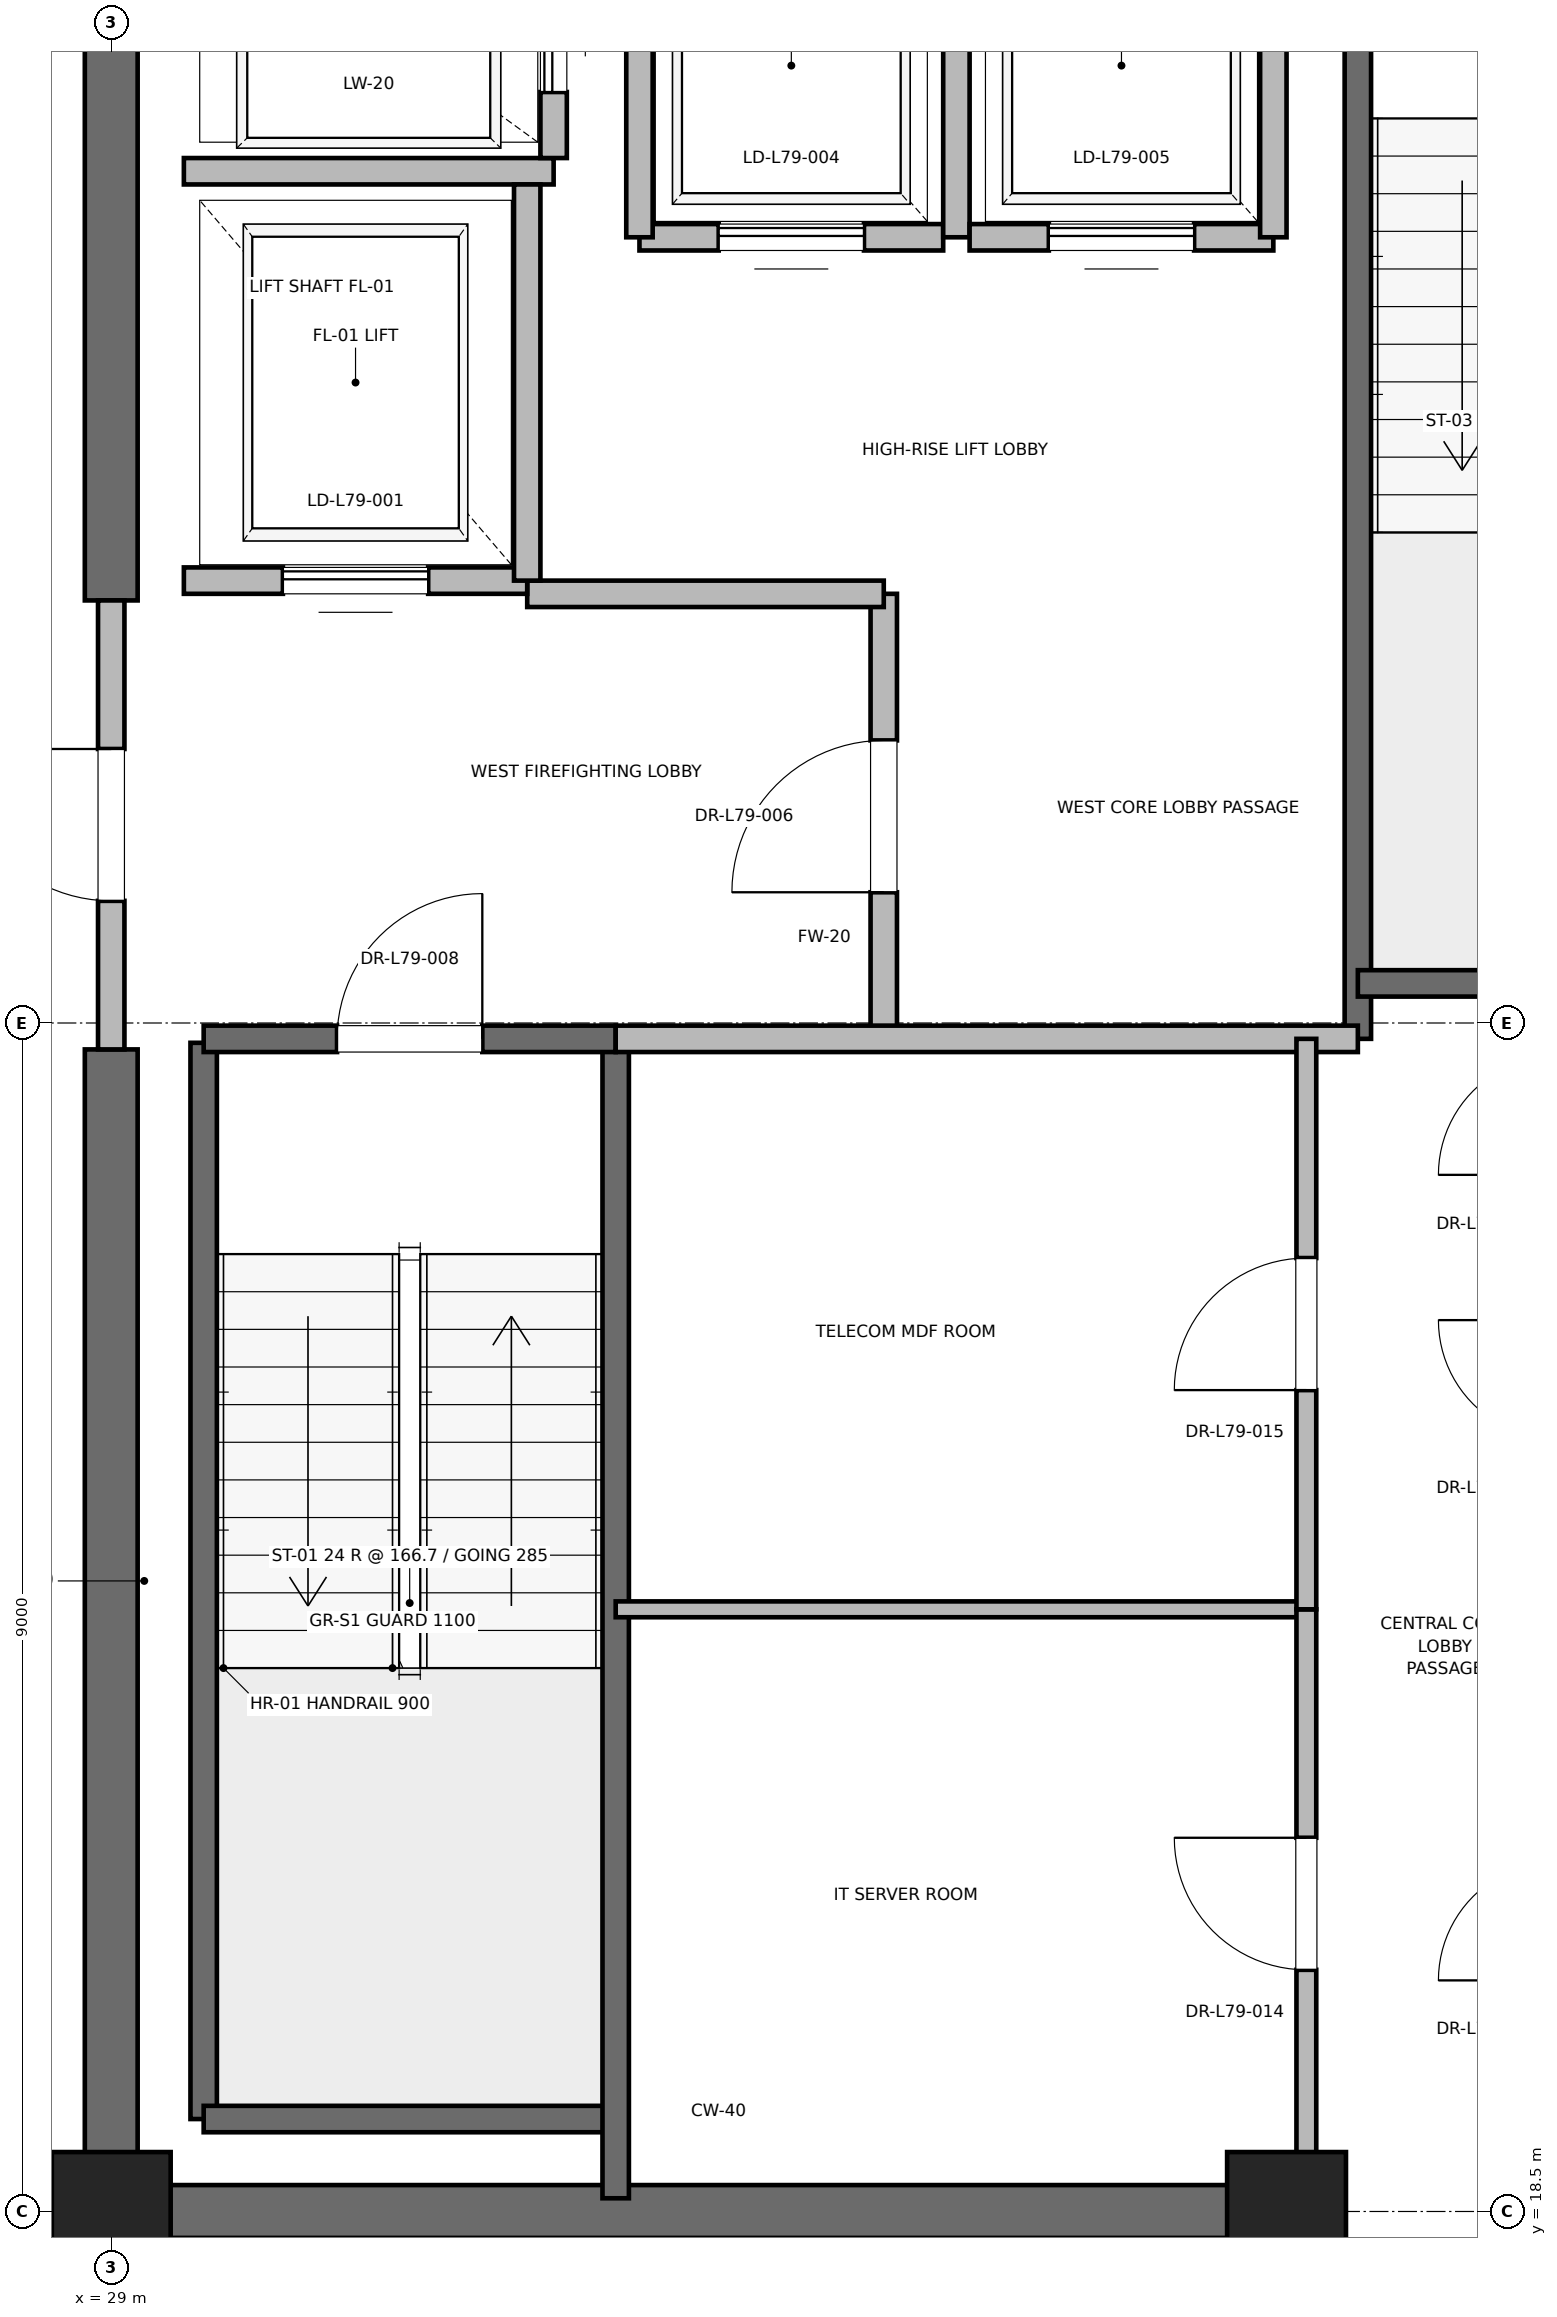
"""IFC4 building model, lengths in metres.
Left out: names, types, materials, properties, quantities, classifications, styles, units other than length and angle.
Written with IfcOpenShell. Run it as: python <this file> out.ifc"""

import sys

from ifc_helpers import new_model, si_unit, direction, frame, frame_2d, origin, origin_2d, place, context, subcontext, project, spatial, rectangle, extrude, element, fill, save


model = new_model("IFC4")
c1 = context("Model", 3, precision=1e-05, world=origin(), true_north=direction((0.0, 1.0)))
c2 = subcontext(c1, "Body", "Model", "MODEL_VIEW")
j1 = project(units=[si_unit("LENGTHUNIT", "METRE"), si_unit("PLANEANGLEUNIT", "RADIAN")], contexts=[c1])
p1 = place(None, origin())
s1 = spatial("IfcSite", under=j1, at=p1, CompositionType="ELEMENT")
p2 = place(p1, origin())
s2 = spatial("IfcBuilding", under=s1, at=p2, CompositionType="ELEMENT")
p3 = place(p2, frame((0.0, 0.0, 338.8)))
s3 = spatial("IfcBuildingStorey", under=s2, at=p3, CompositionType="ELEMENT", Elevation=338.8)
for number, where, z_axis, x_axis in (
    (1, (29.0, 18.5, 0.0), (0.0, 0.0, 1.0), (1.0, 0.0, 0.0)),
    (2, (37.9, 18.5, 0.0), (0.0, 0.0, 1.0), (1.0, 0.0, 0.0)),
):
    element("IfcColumn", number, at=place(p3, frame(where, z_axis=z_axis, x_axis=x_axis)), inside=s3, PredefinedType="PILASTER", context=c2, shape_type="SweptSolid", body=[
        extrude(rectangle(XDim=0.9, YDim=0.9, at=origin_2d()), origin(), (0.0, 0.0, 1.0), 4.0),
    ])
p4 = place(p3, frame((29.0, 18.5, 0.0), z_axis=(0.0, 0.0, 1.0), x_axis=(1.0, 0.0, 0.0)))
e3 = element("IfcWall", 3, at=p4, inside=s3, PredefinedType="SHEAR", context=c2, shape_type="SweptSolid", body=[
    extrude(rectangle(XDim=9.2, YDim=0.4, at=frame_2d((4.6, 0.0))), origin(), (0.0, 0.0, 1.0), 3.7),
])
p5 = place(p3, frame((29.0, 18.5, 0.0), z_axis=(0.0, 0.0, 1.0), x_axis=(0.0, 1.0, 0.0)))
e4 = element("IfcWall", 4, at=p5, inside=s3, PredefinedType="SHEAR", context=c2, shape_type="SweptSolid", body=[
    extrude(rectangle(XDim=8.8, YDim=0.4, at=frame_2d((4.4, 0.0))), origin(), (0.0, 0.0, 1.0), 3.7),
])
p6 = place(p3, frame((29.0, 30.7, 0.0), z_axis=(0.0, 0.0, 1.0), x_axis=(0.0, 1.0, 0.0)))
e5 = element("IfcWall", 5, at=p6, inside=s3, PredefinedType="SHEAR", context=c2, shape_type="SweptSolid", body=[
    extrude(rectangle(XDim=5.8, YDim=0.4, at=frame_2d((2.9, 0.0))), origin(), (0.0, 0.0, 1.0), 3.7),
])
p7 = place(p3, frame((29.7, 19.2, 0.0), z_axis=(0.0, 0.0, 1.0), x_axis=(0.0, 1.0, 0.0)))
e6 = element("IfcWall", 6, at=p7, inside=s3, PredefinedType="SOLIDWALL", context=c2, shape_type="SweptSolid", body=[
    extrude(rectangle(XDim=8.15, YDim=0.2, at=frame_2d((4.075, 0.0))), origin(), (0.0, 0.0, 1.0), 3.7),
])
p8 = place(p3, frame((29.7, 19.2, 0.0), z_axis=(0.0, 0.0, 1.0), x_axis=(1.0, 0.0, 0.0)))
e7 = element("IfcWall", 7, at=p8, inside=s3, PredefinedType="SOLIDWALL", context=c2, shape_type="SweptSolid", body=[
    extrude(rectangle(XDim=3.12, YDim=0.2, at=frame_2d((1.56, 0.0))), origin(), (0.0, 0.0, 1.0), 3.7),
])
p9 = place(p3, frame((32.82, 18.6, 0.0), z_axis=(0.0, 0.0, 1.0), x_axis=(0.0, 1.0, 0.0)))
e8 = element("IfcWall", 8, at=p9, inside=s3, PredefinedType="SOLIDWALL", context=c2, shape_type="SweptSolid", body=[
    extrude(rectangle(XDim=8.78, YDim=0.2, at=frame_2d((4.39, 0.0))), origin(), (0.0, 0.0, 1.0), 3.7),
])
p10 = place(p3, frame((29.7, 27.38, 0.0), z_axis=(0.0, 0.0, 1.0), x_axis=(1.0, 0.0, 0.0)))
e9 = element("IfcWall", 9, at=p10, inside=s3, PredefinedType="SOLIDWALL", context=c2, shape_type="SweptSolid", body=[
    extrude(rectangle(XDim=3.12, YDim=0.2, at=frame_2d((1.56, 0.0))), origin(), (0.0, 0.0, 1.0), 3.7),
])
p11 = place(p10, frame((1.01, 0.0, 0.0)))
e10 = element("IfcOpeningElement", 10, at=p11, cuts=e9, PredefinedType="OPENING", context=c2, shape_type="SweptSolid", body=[
    extrude(rectangle(XDim=1.1, YDim=2.15, at=frame_2d((0.55, 1.075))), frame((0.0, 0.1, 0.0), z_axis=(0.0, -1.0, 0.0), x_axis=(1.0, 0.0, 0.0)), (0.0, 0.0, 1.0), 0.2),
])
p12 = place(p3, frame((38.44, 27.38, 0.0), z_axis=(0.0, 0.0, 1.0), x_axis=(0.0, 1.0, 0.0)))
e11 = element("IfcWall", 11, at=p12, inside=s3, PredefinedType="SOLIDWALL", context=c2, shape_type="SweptSolid", body=[
    extrude(rectangle(XDim=8.87, YDim=0.2, at=frame_2d((4.435, 0.0))), origin(), (0.0, 0.0, 1.0), 3.7),
])
p13 = place(p3, frame((38.44, 27.8, 0.0), z_axis=(0.0, 0.0, 1.0), x_axis=(1.0, 0.0, 0.0)))
e12 = element("IfcWall", 12, at=p13, inside=s3, PredefinedType="SOLIDWALL", context=c2, shape_type="SweptSolid", body=[
    extrude(rectangle(XDim=3.32, YDim=0.2, at=frame_2d((1.66, 0.0))), origin(), (0.0, 0.0, 1.0), 3.7),
])
p14 = place(p3, frame((34.85, 27.38, 0.0), z_axis=(0.0, 0.0, 1.0), x_axis=(0.0, 1.0, 0.0)))
e13 = element("IfcWall", 13, at=p14, inside=s3, PredefinedType="PARTITIONING", context=c2, shape_type="SweptSolid", body=[
    extrude(rectangle(XDim=3.37, YDim=0.2, at=frame_2d((1.685, 0.0))), origin(), (0.0, 0.0, 1.0), 3.7),
])
p15 = place(p14, frame((1.11, 0.0, 0.0)))
e14 = element("IfcOpeningElement", 14, at=p15, cuts=e13, PredefinedType="OPENING", context=c2, shape_type="SweptSolid", body=[
    extrude(rectangle(XDim=1.15, YDim=2.2, at=frame_2d((0.575, 1.1))), frame((0.0, 0.1, 0.0), z_axis=(0.0, -1.0, 0.0), x_axis=(1.0, 0.0, 0.0)), (0.0, 0.0, 1.0), 0.2),
])
p16 = place(p3, frame((29.0, 27.3, 0.0), z_axis=(0.0, 0.0, 1.0), x_axis=(0.0, 1.0, 0.0)))
e15 = element("IfcWall", 15, at=p16, inside=s3, PredefinedType="PARTITIONING", context=c2, shape_type="SweptSolid", body=[
    extrude(rectangle(XDim=3.4, YDim=0.2, at=frame_2d((1.7, 0.0))), origin(), (0.0, 0.0, 1.0), 2.78),
])
p17 = place(p16, frame((1.125, 0.0, 0.0)))
e16 = element("IfcOpeningElement", 16, at=p17, cuts=e15, PredefinedType="OPENING", context=c2, shape_type="SweptSolid", body=[
    extrude(rectangle(XDim=1.15, YDim=2.2, at=frame_2d((0.575, 1.1))), frame((0.0, 0.1, 0.0), z_axis=(0.0, -1.0, 0.0), x_axis=(1.0, 0.0, 0.0)), (0.0, 0.0, 1.0), 0.2),
])
p18 = place(p3, frame((32.82, 27.38, 0.0), z_axis=(0.0, 0.0, 1.0), x_axis=(1.0, 0.0, 0.0)))
e17 = element("IfcWall", 17, at=p18, inside=s3, PredefinedType="PARTITIONING", context=c2, shape_type="SweptSolid", body=[
    extrude(rectangle(XDim=5.62, YDim=0.2, at=frame_2d((2.81, 0.0))), origin(), (0.0, 0.0, 1.0), 3.7),
])
p19 = place(p3, frame((32.15, 30.75, 0.0), z_axis=(0.0, 0.0, 1.0), x_axis=(1.0, 0.0, 0.0)))
e18 = element("IfcWall", 18, at=p19, inside=s3, PredefinedType="PARTITIONING", context=c2, shape_type="SweptSolid", body=[
    extrude(rectangle(XDim=2.7, YDim=0.2, at=frame_2d((1.35, 0.0))), origin(), (0.0, 0.0, 1.0), 3.7),
])
p20 = place(p3, frame((29.55, 30.85, 0.0), z_axis=(0.0, 0.0, 1.0), x_axis=(1.0, 0.0, 0.0)))
e19 = element("IfcWall", 19, at=p20, inside=s3, PredefinedType="SOLIDWALL", context=c2, shape_type="SweptSolid", body=[
    extrude(rectangle(XDim=2.6, YDim=0.2, at=frame_2d((1.3, 0.0))), origin(), (0.0, 0.0, 1.0), 2.78),
])
p21 = place(p20, frame((0.75, 0.0, 0.0)))
e20 = element("IfcOpeningElement", 20, at=p21, cuts=e19, PredefinedType="OPENING", context=c2, shape_type="SweptSolid", body=[
    extrude(rectangle(XDim=1.1, YDim=2.2, at=frame_2d((0.55, 1.1))), frame((0.0, 0.1, 0.0), z_axis=(0.0, -1.0, 0.0), x_axis=(1.0, 0.0, 0.0)), (0.0, 0.0, 1.0), 0.2),
])
p22 = place(p3, frame((29.55, 33.95, 0.0), z_axis=(0.0, 0.0, 1.0), x_axis=(1.0, 0.0, 0.0)))
e21 = element("IfcWall", 21, at=p22, inside=s3, PredefinedType="SOLIDWALL", context=c2, shape_type="SweptSolid", body=[
    extrude(rectangle(XDim=2.8, YDim=0.2, at=frame_2d((1.4, 0.0))), origin(), (0.0, 0.0, 1.0), 3.7),
])
p23 = place(p3, frame((32.15, 30.85, 0.0), z_axis=(0.0, 0.0, 1.0), x_axis=(0.0, 1.0, 0.0)))
e22 = element("IfcWall", 22, at=p23, inside=s3, PredefinedType="SOLIDWALL", context=c2, shape_type="SweptSolid", body=[
    extrude(rectangle(XDim=3.0, YDim=0.2, at=frame_2d((1.5, 0.0))), origin(), (0.0, 0.0, 1.0), 3.7),
])
p24 = place(p3, frame((32.35, 34.05, 0.0), z_axis=(0.0, 0.0, 1.0), x_axis=(0.0, 1.0, 0.0)))
e23 = element("IfcWall", 23, at=p24, inside=s3, PredefinedType="SOLIDWALL", context=c2, shape_type="SweptSolid", body=[
    extrude(rectangle(XDim=2.1, YDim=0.2, at=frame_2d((1.05, 0.0))), origin(), (0.0, 0.0, 1.0), 3.7),
])
p25 = place(p24, frame((0.5, 0.0, 0.0)))
e24 = element("IfcOpeningElement", 24, at=p25, cuts=e23, PredefinedType="OPENING", context=c2, shape_type="SweptSolid", body=[
    extrude(rectangle(XDim=1.1, YDim=2.2, at=frame_2d((0.55, 1.1))), frame((0.0, 0.1, 0.0), z_axis=(0.0, -1.0, 0.0), x_axis=(1.0, 0.0, 0.0)), (0.0, 0.0, 1.0), 0.2),
])
p26 = place(p3, frame((33.0, 33.45, 0.0), z_axis=(0.0, 0.0, 1.0), x_axis=(1.0, 0.0, 0.0)))
e25 = element("IfcWall", 25, at=p26, inside=s3, PredefinedType="SOLIDWALL", context=c2, shape_type="SweptSolid", body=[
    extrude(rectangle(XDim=2.3, YDim=0.2, at=frame_2d((1.15, 0.0))), origin(), (0.0, 0.0, 1.0), 3.7),
])
p27 = place(p26, frame((0.6, 0.0, 0.0)))
e26 = element("IfcOpeningElement", 26, at=p27, cuts=e25, PredefinedType="OPENING", context=c2, shape_type="SweptSolid", body=[
    extrude(rectangle(XDim=1.1, YDim=2.2, at=frame_2d((0.55, 1.1))), frame((0.0, 0.1, 0.0), z_axis=(0.0, -1.0, 0.0), x_axis=(1.0, 0.0, 0.0)), (0.0, 0.0, 1.0), 0.2),
])
p28 = place(p3, frame((33.0, 36.05, 0.0), z_axis=(0.0, 0.0, 1.0), x_axis=(0.0, -1.0, 0.0)))
e27 = element("IfcWall", 27, at=p28, inside=s3, PredefinedType="SOLIDWALL", context=c2, shape_type="SweptSolid", body=[
    extrude(rectangle(XDim=2.6, YDim=0.2, at=frame_2d((1.3, 0.0))), origin(), (0.0, 0.0, 1.0), 3.7),
])
p29 = place(p3, frame((35.4, 33.45, 0.0), z_axis=(0.0, 0.0, 1.0), x_axis=(0.0, 1.0, 0.0)))
e28 = element("IfcWall", 28, at=p29, inside=s3, PredefinedType="SOLIDWALL", context=c2, shape_type="SweptSolid", body=[
    extrude(rectangle(XDim=2.6, YDim=0.2, at=frame_2d((1.3, 0.0))), origin(), (0.0, 0.0, 1.0), 2.78),
])
p30 = place(p3, frame((35.5, 33.45, 0.0), z_axis=(0.0, 0.0, 1.0), x_axis=(1.0, 0.0, 0.0)))
e29 = element("IfcWall", 29, at=p30, inside=s3, PredefinedType="SOLIDWALL", context=c2, shape_type="SweptSolid", body=[
    extrude(rectangle(XDim=2.3, YDim=0.2, at=frame_2d((1.15, 0.0))), origin(), (0.0, 0.0, 1.0), 3.7),
])
p31 = place(p30, frame((0.6, 0.0, 0.0)))
e30 = element("IfcOpeningElement", 30, at=p31, cuts=e29, PredefinedType="OPENING", context=c2, shape_type="SweptSolid", body=[
    extrude(rectangle(XDim=1.1, YDim=2.2, at=frame_2d((0.55, 1.1))), frame((0.0, 0.1, 0.0), z_axis=(0.0, -1.0, 0.0), x_axis=(1.0, 0.0, 0.0)), (0.0, 0.0, 1.0), 0.2),
])
p32 = place(p3, frame((37.8, 33.45, 0.0), z_axis=(0.0, 0.0, 1.0), x_axis=(0.0, 1.0, 0.0)))
e31 = element("IfcWall", 31, at=p32, inside=s3, PredefinedType="SOLIDWALL", context=c2, shape_type="SweptSolid", body=[
    extrude(rectangle(XDim=2.6, YDim=0.2, at=frame_2d((1.3, 0.0))), origin(), (0.0, 0.0, 1.0), 2.78),
])
p33 = place(p3, frame((32.82, 23.06, 0.0), z_axis=(0.0, 0.0, 1.0), x_axis=(1.0, 0.0, 0.0)))
e32 = element("IfcWall", 32, at=p33, inside=s3, PredefinedType="PARTITIONING", context=c2, shape_type="SweptSolid", body=[
    extrude(rectangle(XDim=5.23, YDim=0.12, at=frame_2d((2.615, 0.0))), origin(), (0.0, 0.0, 1.0), 2.85),
])
p34 = place(p3, frame((38.05, 18.6, 0.0), z_axis=(0.0, 0.0, 1.0), x_axis=(0.0, 1.0, 0.0)))
e33 = element("IfcWall", 33, at=p34, inside=s3, PredefinedType="PARTITIONING", context=c2, shape_type="SweptSolid", body=[
    extrude(rectangle(XDim=4.46, YDim=0.15, at=frame_2d((2.23, 0.0))), origin(), (0.0, 0.0, 1.0), 2.78),
])
p35 = place(p34, frame((1.73, 0.0, 0.0)))
e34 = element("IfcOpeningElement", 34, at=p35, cuts=e33, PredefinedType="OPENING", context=c2, shape_type="SweptSolid", body=[
    extrude(rectangle(XDim=1.0, YDim=2.15, at=frame_2d((0.5, 1.075))), frame((0.0, 0.075, 0.0), z_axis=(0.0, -1.0, 0.0), x_axis=(1.0, 0.0, 0.0)), (0.0, 0.0, 1.0), 0.15),
])
p36 = place(p3, frame((38.05, 23.06, 0.0), z_axis=(0.0, 0.0, 1.0), x_axis=(0.0, 1.0, 0.0)))
e35 = element("IfcWall", 35, at=p36, inside=s3, PredefinedType="PARTITIONING", context=c2, shape_type="SweptSolid", body=[
    extrude(rectangle(XDim=4.32, YDim=0.15, at=frame_2d((2.16, 0.0))), origin(), (0.0, 0.0, 1.0), 2.85),
])
p37 = place(p36, frame((1.66, 0.0, 0.0)))
e36 = element("IfcOpeningElement", 36, at=p37, cuts=e35, PredefinedType="OPENING", context=c2, shape_type="SweptSolid", body=[
    extrude(rectangle(XDim=1.0, YDim=2.15, at=frame_2d((0.5, 1.075))), frame((0.0, 0.075, 0.0), z_axis=(0.0, -1.0, 0.0), x_axis=(1.0, 0.0, 0.0)), (0.0, 0.0, 1.0), 0.15),
])
p38 = place(p11, origin())
e37 = element("IfcDoor", 37, at=p38, inside=s3, OperationType="SINGLE_SWING_RIGHT", PredefinedType="DOOR", context=c2, shape_type="SweptSolid", body=[
    extrude(rectangle(XDim=1.1, YDim=2.15, at=frame_2d((0.55, 1.075))), frame((0.0, 0.025, 0.0), z_axis=(0.0, -1.0, 0.0), x_axis=(1.0, 0.0, 0.0)), (0.0, 0.0, 1.0), 0.05),
])
fill(e10, e37)
p39 = place(p15, origin())
e38 = element("IfcDoor", 38, at=p39, inside=s3, OperationType="SINGLE_SWING_LEFT", PredefinedType="DOOR", context=c2, shape_type="SweptSolid", body=[
    extrude(rectangle(XDim=1.15, YDim=2.2, at=frame_2d((0.575, 1.1))), frame((0.0, 0.025, 0.0), z_axis=(0.0, -1.0, 0.0), x_axis=(1.0, 0.0, 0.0)), (0.0, 0.0, 1.0), 0.05),
])
fill(e14, e38)
p40 = place(p17, origin())
e39 = element("IfcDoor", 39, at=p40, inside=s3, OperationType="SINGLE_SWING_RIGHT", PredefinedType="DOOR", context=c2, shape_type="SweptSolid", body=[
    extrude(rectangle(XDim=1.15, YDim=2.2, at=frame_2d((0.575, 1.1))), frame((0.0, 0.025, 0.0), z_axis=(0.0, -1.0, 0.0), x_axis=(1.0, 0.0, 0.0)), (0.0, 0.0, 1.0), 0.05),
])
fill(e16, e39)
p41 = place(p21, origin())
e40 = element("IfcDoor", 40, at=p41, inside=s3, OperationType="SLIDING_TO_RIGHT", PredefinedType="DOOR", context=c2, shape_type="SweptSolid", body=[
    extrude(rectangle(XDim=1.1, YDim=2.2, at=frame_2d((0.55, 1.1))), frame((0.0, 0.025, 0.0), z_axis=(0.0, -1.0, 0.0), x_axis=(1.0, 0.0, 0.0)), (0.0, 0.0, 1.0), 0.05),
])
fill(e20, e40)
p42 = place(p25, origin())
e41 = element("IfcDoor", 41, at=p42, inside=s3, OperationType="SLIDING_TO_RIGHT", PredefinedType="DOOR", context=c2, shape_type="SweptSolid", body=[
    extrude(rectangle(XDim=1.1, YDim=2.2, at=frame_2d((0.55, 1.1))), frame((0.0, 0.025, 0.0), z_axis=(0.0, -1.0, 0.0), x_axis=(1.0, 0.0, 0.0)), (0.0, 0.0, 1.0), 0.05),
])
fill(e24, e41)
p43 = place(p27, origin())
e42 = element("IfcDoor", 42, at=p43, inside=s3, OperationType="SLIDING_TO_RIGHT", PredefinedType="DOOR", context=c2, shape_type="SweptSolid", body=[
    extrude(rectangle(XDim=1.1, YDim=2.2, at=frame_2d((0.55, 1.1))), frame((0.0, 0.025, 0.0), z_axis=(0.0, -1.0, 0.0), x_axis=(1.0, 0.0, 0.0)), (0.0, 0.0, 1.0), 0.05),
])
fill(e26, e42)
p44 = place(p31, origin())
e43 = element("IfcDoor", 43, at=p44, inside=s3, OperationType="SLIDING_TO_RIGHT", PredefinedType="DOOR", context=c2, shape_type="SweptSolid", body=[
    extrude(rectangle(XDim=1.1, YDim=2.2, at=frame_2d((0.55, 1.1))), frame((0.0, 0.025, 0.0), z_axis=(0.0, -1.0, 0.0), x_axis=(1.0, 0.0, 0.0)), (0.0, 0.0, 1.0), 0.05),
])
fill(e30, e43)
p45 = place(p35, origin())
e44 = element("IfcDoor", 44, at=p45, inside=s3, OperationType="SINGLE_SWING_RIGHT", PredefinedType="DOOR", context=c2, shape_type="SweptSolid", body=[
    extrude(rectangle(XDim=1.0, YDim=2.15, at=frame_2d((0.5, 1.075))), frame((0.0, 0.025, 0.0), z_axis=(0.0, -1.0, 0.0), x_axis=(1.0, 0.0, 0.0)), (0.0, 0.0, 1.0), 0.05),
])
fill(e34, e44)
p46 = place(p37, origin())
e45 = element("IfcDoor", 45, at=p46, inside=s3, OperationType="SINGLE_SWING_LEFT", PredefinedType="DOOR", context=c2, shape_type="SweptSolid", body=[
    extrude(rectangle(XDim=1.0, YDim=2.15, at=frame_2d((0.5, 1.075))), frame((0.0, 0.025, 0.0), z_axis=(0.0, -1.0, 0.0), x_axis=(1.0, 0.0, 0.0)), (0.0, 0.0, 1.0), 0.05),
])
fill(e36, e45)
save(model, sys.argv[1])
